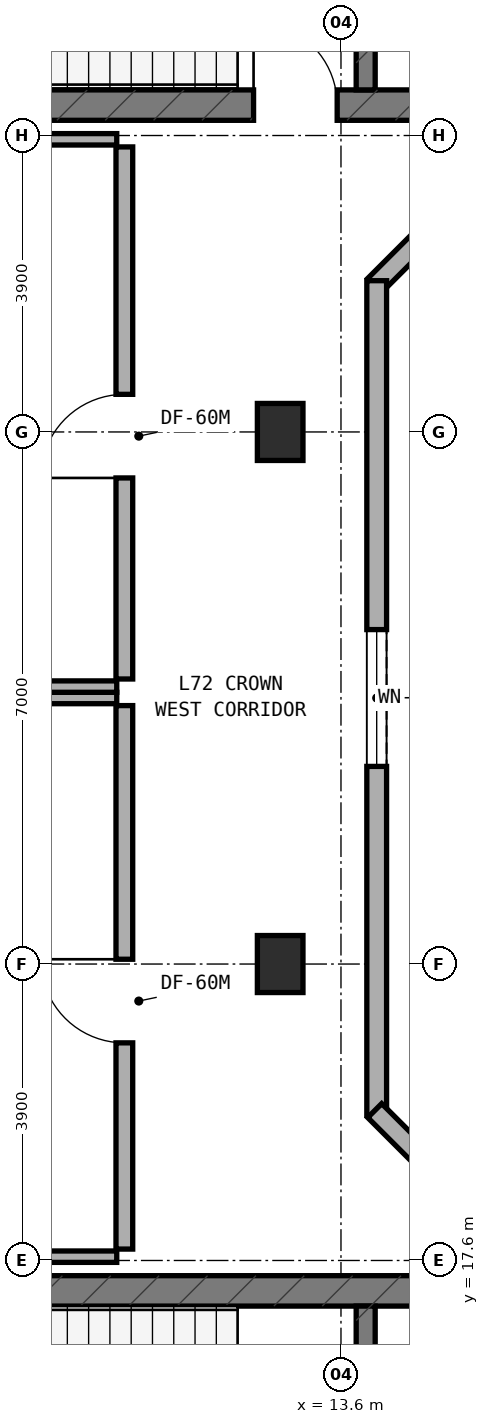
"""IFC4 building model, lengths in metres.
Left out: names, types, materials, properties, quantities, classifications, styles, units other than length and angle.
Written with IfcOpenShell. Run it as: python <this file> out.ifc"""

import sys

from ifc_helpers import new_model, si_unit, direction, frame, frame_2d, origin, origin_2d, place, context, subcontext, project, spatial, rectangle, extrude, element, fill, save


model = new_model("IFC4")
c1 = context("Model", 3, precision=1e-05, world=origin(), true_north=direction((0.0, 1.0)))
c2 = subcontext(c1, "Body", "Model", "MODEL_VIEW")
j1 = project(units=[si_unit("LENGTHUNIT", "METRE"), si_unit("PLANEANGLEUNIT", "RADIAN")], contexts=[c1])
p1 = place(None, origin())
s1 = spatial("IfcSite", under=j1, at=p1, CompositionType="ELEMENT")
p2 = place(p1, origin())
s2 = spatial("IfcBuilding", under=s1, at=p2, CompositionType="ELEMENT")
p3 = place(p2, frame((0.0, 0.0, 264.8)))
s3 = spatial("IfcBuildingStorey", under=s2, at=p3, CompositionType="ELEMENT", Elevation=264.8)
p4 = place(p3, frame((6.4, 32.8, 0.0), z_axis=(0.0, 0.0, 1.0), x_axis=(1.0, 0.0, 0.0)))
e1 = element("IfcWall", 1, at=p4, inside=s3, PredefinedType="SHEAR", context=c2, shape_type="SweptSolid", body=[
    extrude(rectangle(XDim=24.4, YDim=0.4, at=frame_2d((12.2, 0.0))), origin(), (0.0, 0.0, 1.0), 3.6),
])
p5 = place(p4, frame((6.05, 0.0, 0.0)))
e2 = element("IfcOpeningElement", 2, at=p5, cuts=e1, PredefinedType="OPENING", context=c2, shape_type="SweptSolid", body=[
    extrude(rectangle(XDim=1.1, YDim=2.15, at=frame_2d((0.55, 1.075))), frame((0.0, 0.21, 0.0), z_axis=(0.0, -1.0, 0.0), x_axis=(1.0, 0.0, 0.0)), (0.0, 0.0, 1.0), 0.42),
])
p6 = place(p3, frame((13.925, 33.0, 0.0), z_axis=(0.0, 0.0, 1.0), x_axis=(0.0, 1.0, 0.0)))
e3 = element("IfcWall", 3, at=p6, inside=s3, PredefinedType="STANDARD", context=c2, shape_type="SweptSolid", body=[
    extrude(rectangle(XDim=3.16, YDim=0.25, at=frame_2d((1.58, 0.0))), origin(), (0.0, 0.0, 1.0), 3.32),
])
p7 = place(p6, frame((0.98, 0.0, 0.0)))
e4 = element("IfcOpeningElement", 4, at=p7, cuts=e3, PredefinedType="OPENING", context=c2, shape_type="SweptSolid", body=[
    extrude(rectangle(XDim=1.1, YDim=2.15, at=frame_2d((0.55, 1.075))), frame((0.0, 0.135, 0.0), z_axis=(0.0, -1.0, 0.0), x_axis=(1.0, 0.0, 0.0)), (0.0, 0.0, 1.0), 0.27),
])
p8 = place(p3, frame((6.4, 17.2, 0.0), z_axis=(0.0, 0.0, 1.0), x_axis=(1.0, 0.0, 0.0)))
e5 = element("IfcWall", 5, at=p8, inside=s3, PredefinedType="SHEAR", context=c2, shape_type="SweptSolid", body=[
    extrude(rectangle(XDim=24.4, YDim=0.4, at=frame_2d((12.2, 0.0))), origin(), (0.0, 0.0, 1.0), 3.6),
])
p9 = place(p3, frame((13.925, 13.84, 0.0), z_axis=(0.0, 0.0, 1.0), x_axis=(0.0, 1.0, 0.0)))
e6 = element("IfcWall", 6, at=p9, inside=s3, PredefinedType="STANDARD", context=c2, shape_type="SweptSolid", body=[
    extrude(rectangle(XDim=3.16, YDim=0.25, at=frame_2d((1.58, 0.0))), origin(), (0.0, 0.0, 1.0), 3.32),
])
p10 = place(p9, frame((0.98, 0.0, 0.0)))
e7 = element("IfcOpeningElement", 7, at=p10, cuts=e6, PredefinedType="OPENING", context=c2, shape_type="SweptSolid", body=[
    extrude(rectangle(XDim=1.1, YDim=2.15, at=frame_2d((0.55, 1.075))), frame((0.0, 0.135, 0.0), z_axis=(0.0, -1.0, 0.0), x_axis=(1.0, 0.0, 0.0)), (0.0, 0.0, 1.0), 0.27),
])
for number, where, z_axis, x_axis in (
    (8, (12.8, 21.5, 0.0), (0.0, 0.0, 1.0), (1.0, 0.0, 0.0)),
    (9, (12.8, 28.5, 0.0), (0.0, 0.0, 1.0), (1.0, 0.0, 0.0)),
):
    element("IfcColumn", number, at=place(p3, frame(where, z_axis=z_axis, x_axis=x_axis)), inside=s3, PredefinedType="COLUMN", context=c2, shape_type="SweptSolid", body=[
        extrude(rectangle(XDim=0.6, YDim=0.75, at=origin_2d()), origin(), (0.0, 0.0, 1.0), 3.6),
    ])
p11 = place(p3, frame((15.678, 32.062, 0.0), z_axis=(0.0, 0.0, 1.0), x_axis=(-0.707106781187, -0.707106781187, 0.0)))
e10 = element("IfcWall", 10, at=p11, inside=s3, PredefinedType="STANDARD", context=c2, shape_type="SweptSolid", body=[
    extrude(rectangle(XDim=2.311, YDim=0.26, at=frame_2d((1.155, 0.0))), origin(), (0.0, 0.0, 1.0), 3.32),
])
p12 = place(p3, frame((14.07, 30.49, 0.0), z_axis=(0.0, 0.0, 1.0), x_axis=(0.0, -1.0, 0.0)))
e11 = element("IfcWall", 11, at=p12, inside=s3, PredefinedType="STANDARD", context=c2, shape_type="SweptSolid", body=[
    extrude(rectangle(XDim=10.98, YDim=0.26, at=frame_2d((5.49, 0.0))), origin(), (0.0, 0.0, 1.0), 3.32),
])
p13 = place(p12, frame((4.59, 0.0, 0.85)))
e12 = element("IfcOpeningElement", 12, at=p13, cuts=e11, PredefinedType="OPENING", context=c2, shape_type="SweptSolid", body=[
    extrude(rectangle(XDim=1.8, YDim=1.5, at=frame_2d((0.9, 0.75))), frame((0.0, 0.14, 0.0), z_axis=(0.0, -1.0, 0.0), x_axis=(1.0, 0.0, 0.0)), (0.0, 0.0, 1.0), 0.28),
])
p14 = place(p3, frame((14.044, 19.572, 0.0), z_axis=(0.0, 0.0, 1.0), x_axis=(0.707106781187, -0.707106781187, 0.0)))
e13 = element("IfcWall", 13, at=p14, inside=s3, PredefinedType="STANDARD", context=c2, shape_type="SweptSolid", body=[
    extrude(rectangle(XDim=2.311, YDim=0.26, at=frame_2d((1.155, 0.0))), origin(), (0.0, 0.0, 1.0), 3.32),
])
p15 = place(p3, frame((4.44, 17.65, 0.0), z_axis=(0.0, 0.0, 1.0), x_axis=(1.0, 0.0, 0.0)))
e14 = element("IfcWall", 14, at=p15, inside=s3, PredefinedType="PARTITIONING", context=c2, shape_type="SweptSolid", body=[
    extrude(rectangle(XDim=6.21, YDim=0.15, at=frame_2d((3.105, 0.0))), origin(), (0.0, 0.0, 1.0), 3.32),
])
p16 = place(p3, frame((4.44, 25.0, 0.0), z_axis=(0.0, 0.0, 1.0), x_axis=(1.0, 0.0, 0.0)))
e15 = element("IfcWall", 15, at=p16, inside=s3, PredefinedType="PARTITIONING", context=c2, shape_type="SweptSolid", body=[
    extrude(rectangle(XDim=6.21, YDim=0.15, at=frame_2d((3.105, 0.0))), origin(), (0.0, 0.0, 1.0), 3.015),
])
p17 = place(p3, frame((10.75, 17.75, 0.0), z_axis=(0.0, 0.0, 1.0), x_axis=(0.0, 1.0, 0.0)))
e16 = element("IfcWall", 16, at=p17, inside=s3, PredefinedType="SOLIDWALL", context=c2, shape_type="SweptSolid", body=[
    extrude(rectangle(XDim=7.15, YDim=0.22, at=frame_2d((3.575, 0.0))), origin(), (0.0, 0.0, 1.0), 2.795),
])
p18 = place(p17, frame((2.713, 0.0, 0.0)))
e17 = element("IfcOpeningElement", 17, at=p18, cuts=e16, PredefinedType="OPENING", context=c2, shape_type="SweptSolid", body=[
    extrude(rectangle(XDim=1.1, YDim=2.1, at=frame_2d((0.55, 1.05))), frame((0.0, 0.12, 0.0), z_axis=(0.0, -1.0, 0.0), x_axis=(1.0, 0.0, 0.0)), (0.0, 0.0, 1.0), 0.24),
])
p19 = place(p3, frame((4.44, 25.15, 0.0), z_axis=(0.0, 0.0, 1.0), x_axis=(1.0, 0.0, 0.0)))
e18 = element("IfcWall", 18, at=p19, inside=s3, PredefinedType="PARTITIONING", context=c2, shape_type="SweptSolid", body=[
    extrude(rectangle(XDim=6.21, YDim=0.15, at=frame_2d((3.105, 0.0))), origin(), (0.0, 0.0, 1.0), 3.015),
])
p20 = place(p3, frame((4.44, 32.35, 0.0), z_axis=(0.0, 0.0, 1.0), x_axis=(1.0, 0.0, 0.0)))
e19 = element("IfcWall", 19, at=p20, inside=s3, PredefinedType="PARTITIONING", context=c2, shape_type="SweptSolid", body=[
    extrude(rectangle(XDim=6.21, YDim=0.15, at=frame_2d((3.105, 0.0))), origin(), (0.0, 0.0, 1.0), 3.32),
])
p21 = place(p3, frame((10.75, 25.25, 0.0), z_axis=(0.0, 0.0, 1.0), x_axis=(0.0, 1.0, 0.0)))
e20 = element("IfcWall", 20, at=p21, inside=s3, PredefinedType="SOLIDWALL", context=c2, shape_type="SweptSolid", body=[
    extrude(rectangle(XDim=7.0, YDim=0.22, at=frame_2d((3.5, 0.0))), origin(), (0.0, 0.0, 1.0), 2.795),
])
p22 = place(p21, frame((2.645, 0.0, 0.0)))
e21 = element("IfcOpeningElement", 21, at=p22, cuts=e20, PredefinedType="OPENING", context=c2, shape_type="SweptSolid", body=[
    extrude(rectangle(XDim=1.1, YDim=2.1, at=frame_2d((0.55, 1.05))), frame((0.0, 0.12, 0.0), z_axis=(0.0, -1.0, 0.0), x_axis=(1.0, 0.0, 0.0)), (0.0, 0.0, 1.0), 0.24),
])
p23 = place(p13, origin())
e22 = element("IfcWindow", 22, at=p23, inside=s3, PartitioningType="SINGLE_PANEL", PredefinedType="WINDOW", context=c2, shape_type="SweptSolid", body=[
    extrude(rectangle(XDim=1.8, YDim=1.5, at=frame_2d((0.9, 0.75))), frame((0.0, 0.03, 0.0), z_axis=(0.0, -1.0, 0.0), x_axis=(1.0, 0.0, 0.0)), (0.0, 0.0, 1.0), 0.06),
])
fill(e12, e22)
p24 = place(p5, origin())
e23 = element("IfcDoor", 23, at=p24, inside=s3, OperationType="SINGLE_SWING_LEFT", PredefinedType="DOOR", context=c2, shape_type="SweptSolid", body=[
    extrude(rectangle(XDim=1.1, YDim=2.15, at=frame_2d((0.55, 1.075))), frame((0.0, 0.025, 0.0), z_axis=(0.0, -1.0, 0.0), x_axis=(1.0, 0.0, 0.0)), (0.0, 0.0, 1.0), 0.05),
])
fill(e2, e23)
p25 = place(p18, origin())
e24 = element("IfcDoor", 24, at=p25, inside=s3, OperationType="SINGLE_SWING_RIGHT", PredefinedType="DOOR", context=c2, shape_type="SweptSolid", body=[
    extrude(rectangle(XDim=1.1, YDim=2.1, at=frame_2d((0.55, 1.05))), frame((0.0, 0.025, 0.0), z_axis=(0.0, -1.0, 0.0), x_axis=(1.0, 0.0, 0.0)), (0.0, 0.0, 1.0), 0.05),
])
fill(e17, e24)
p26 = place(p22, origin())
e25 = element("IfcDoor", 25, at=p26, inside=s3, OperationType="SINGLE_SWING_LEFT", PredefinedType="DOOR", context=c2, shape_type="SweptSolid", body=[
    extrude(rectangle(XDim=1.1, YDim=2.1, at=frame_2d((0.55, 1.05))), frame((0.0, 0.025, 0.0), z_axis=(0.0, -1.0, 0.0), x_axis=(1.0, 0.0, 0.0)), (0.0, 0.0, 1.0), 0.05),
])
fill(e21, e25)
save(model, sys.argv[1])
